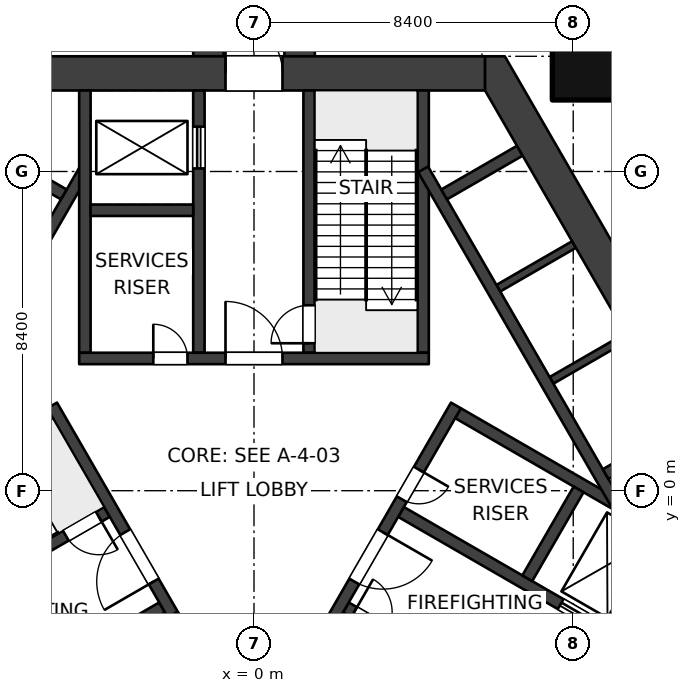
"""IFC4 building model, lengths in metres.
Left out: names, types, materials, properties, quantities, classifications, styles, units other than length and angle.
Written with IfcOpenShell. Run it as: python <this file> out.ifc"""

import sys

from ifc_helpers import new_model, si_unit, direction, frame, frame_2d, origin, origin_2d, place, context, subcontext, project, spatial, polyline, rectangle, outline, extrude, element, fill, save


model = new_model("IFC4")
c1 = context("Model", 3, precision=1e-05, world=origin(), true_north=direction((0.0, 1.0)))
c2 = subcontext(c1, "Body", "Model", "MODEL_VIEW")
j1 = project(units=[si_unit("LENGTHUNIT", "METRE"), si_unit("PLANEANGLEUNIT", "RADIAN")], contexts=[c1])
p1 = place(None, origin())
s1 = spatial("IfcSite", under=j1, at=p1, CompositionType="ELEMENT")
p2 = place(p1, origin())
s2 = spatial("IfcBuilding", under=s1, at=p2, CompositionType="ELEMENT")
p3 = place(p2, frame((0.0, 0.0, 11.0)))
s3 = spatial("IfcBuildingStorey", under=s2, at=p3, CompositionType="ELEMENT", Elevation=11.0)
p4 = place(p3, frame((9.0, 11.432, 0.0), z_axis=(0.0, 0.0, 1.0), x_axis=(1.0, 0.0, 0.0)))
e1 = element("IfcColumn", 1, at=p4, inside=s3, PredefinedType="COLUMN", context=c2, shape_type="SweptSolid", body=[
    extrude(rectangle(XDim=2.3, YDim=2.3, at=origin_2d()), origin(), (0.0, 0.0, 1.0), 5.0),
])
p5 = place(p3, frame((-6.08, 10.981, 0.0), z_axis=(0.0, 0.0, 1.0), x_axis=(1.0, 0.0, 0.0)))
e2 = element("IfcWall", 2, at=p5, inside=s3, PredefinedType="SHEAR", context=c2, shape_type="SweptSolid", body=[
    extrude(rectangle(XDim=12.161, YDim=0.9, at=frame_2d((6.08, 0.0))), origin(), (0.0, 0.0, 1.0), 5.0),
])
p6 = place(p5, frame((5.33, 0.0, 0.0)))
e3 = element("IfcOpeningElement", 3, at=p6, cuts=e2, PredefinedType="OPENING", context=c2, shape_type="SweptSolid", body=[
    extrude(rectangle(XDim=1.5, YDim=2.1, at=frame_2d((0.75, 1.05))), frame((0.0, 0.46, 0.0), z_axis=(0.0, -1.0, 0.0), x_axis=(1.0, 0.0, 0.0)), (0.0, 0.0, 1.0), 0.92),
])
p7 = place(p3, frame((12.551, -0.225, 0.0), z_axis=(0.0, 0.0, 1.0), x_axis=(-0.499997612506, -0.8660267822, 0.0)))
e4 = element("IfcWall", 4, at=p7, inside=s3, PredefinedType="SHEAR", context=c2, shape_type="SweptSolid", body=[
    extrude(rectangle(XDim=12.161, YDim=0.9, at=frame_2d((6.08, 0.0))), origin(), (0.0, 0.0, 1.0), 5.0),
])
p8 = place(p7, frame((5.33, 0.0, 0.0)))
e5 = element("IfcOpeningElement", 5, at=p8, cuts=e4, PredefinedType="OPENING", context=c2, shape_type="SweptSolid", body=[
    extrude(rectangle(XDim=1.5, YDim=2.1, at=frame_2d((0.75, 1.05))), frame((0.0, 0.46, 0.0), z_axis=(0.0, -1.0, 0.0), x_axis=(1.0, 0.0, 0.0)), (0.0, 0.0, 1.0), 0.92),
])
p9 = place(p3, origin())
e6 = element("IfcWall", 6, at=p9, inside=s3, PredefinedType="SHEAR", context=c2, shape_type="SweptSolid", body=[
    extrude(outline(polyline([(13.2, 0.0), (6.6, 11.432), (6.08, 11.432), (6.08, 10.531), (12.161, 0.0), (12.94, -0.45), (13.2, 0.0)])), origin(), (0.0, 0.0, 1.0), 5.0),
])
p10 = place(p3, frame((-4.6, 3.48, 0.0), z_axis=(0.0, 0.0, 1.0), x_axis=(1.0, 0.0, 0.0)))
e7 = element("IfcWall", 7, at=p10, inside=s3, PredefinedType="SHEAR", context=c2, shape_type="SweptSolid", body=[
    extrude(rectangle(XDim=9.2, YDim=0.3, at=frame_2d((4.6, 0.0))), origin(), (0.0, 0.0, 1.0), 5.0),
])
p11 = place(p10, frame((3.85, 0.0, 0.0)))
e8 = element("IfcOpeningElement", 8, at=p11, cuts=e7, PredefinedType="OPENING", context=c2, shape_type="SweptSolid", body=[
    extrude(rectangle(XDim=1.5, YDim=2.1, at=frame_2d((0.75, 1.05))), frame((0.0, 0.16, 0.0), z_axis=(0.0, -1.0, 0.0), x_axis=(1.0, 0.0, 0.0)), (0.0, 0.0, 1.0), 0.32),
])
p12 = place(p10, frame((1.95, 0.0, 0.0)))
e9 = element("IfcOpeningElement", 9, at=p12, cuts=e7, PredefinedType="OPENING", context=c2, shape_type="SweptSolid", body=[
    extrude(rectangle(XDim=0.9, YDim=2.1, at=frame_2d((0.45, 1.05))), frame((0.0, 0.16, 0.0), z_axis=(0.0, -1.0, 0.0), x_axis=(1.0, 0.0, 0.0)), (0.0, 0.0, 1.0), 0.32),
])
p13 = place(p3, frame((1.45, 3.63, 0.0), z_axis=(0.0, 0.0, 1.0), x_axis=(0.0, 1.0, 0.0)))
e10 = element("IfcWall", 10, at=p13, inside=s3, PredefinedType="SHEAR", context=c2, shape_type="SweptSolid", body=[
    extrude(rectangle(XDim=6.902, YDim=0.3, at=frame_2d((3.451, 0.0))), origin(), (0.0, 0.0, 1.0), 5.0),
])
p14 = place(p13, frame((0.25, 0.0, 0.0)))
e11 = element("IfcOpeningElement", 11, at=p14, cuts=e10, PredefinedType="OPENING", context=c2, shape_type="SweptSolid", body=[
    extrude(rectangle(XDim=1.0, YDim=2.1, at=frame_2d((0.5, 1.05))), frame((0.0, 0.16, 0.0), z_axis=(0.0, -1.0, 0.0), x_axis=(1.0, 0.0, 0.0)), (0.0, 0.0, 1.0), 0.32),
])
p15 = place(p3, frame((4.45, 3.63, 0.0), z_axis=(0.0, 0.0, 1.0), x_axis=(0.0, 1.0, 0.0)))
e12 = element("IfcWall", 12, at=p15, inside=s3, PredefinedType="SHEAR", context=c2, shape_type="SweptSolid", body=[
    extrude(rectangle(XDim=6.902, YDim=0.3, at=frame_2d((3.451, 0.0))), origin(), (0.0, 0.0, 1.0), 5.0),
])
p16 = place(p3, frame((-1.45, 3.63, 0.0), z_axis=(0.0, 0.0, 1.0), x_axis=(0.0, 1.0, 0.0)))
e13 = element("IfcWall", 13, at=p16, inside=s3, PredefinedType="SHEAR", context=c2, shape_type="SweptSolid", body=[
    extrude(rectangle(XDim=6.902, YDim=0.3, at=frame_2d((3.451, 0.0))), origin(), (0.0, 0.0, 1.0), 5.0),
])
p17 = place(p16, frame((4.85, 0.0, 0.0)))
e14 = element("IfcOpeningElement", 14, at=p17, cuts=e13, PredefinedType="OPENING", context=c2, shape_type="SweptSolid", body=[
    extrude(rectangle(XDim=1.1, YDim=2.1, at=frame_2d((0.55, 1.05))), frame((0.0, 0.16, 0.0), z_axis=(0.0, -1.0, 0.0), x_axis=(1.0, 0.0, 0.0)), (0.0, 0.0, 1.0), 0.32),
])
p18 = place(p3, frame((-4.45, 3.63, 0.0), z_axis=(0.0, 0.0, 1.0), x_axis=(0.0, 1.0, 0.0)))
e15 = element("IfcWall", 15, at=p18, inside=s3, PredefinedType="SHEAR", context=c2, shape_type="SweptSolid", body=[
    extrude(rectangle(XDim=6.902, YDim=0.3, at=frame_2d((3.451, 0.0))), origin(), (0.0, 0.0, 1.0), 5.0),
])
p19 = place(p3, frame((-4.3, 7.38, 0.0), z_axis=(0.0, 0.0, 1.0), x_axis=(1.0, 0.0, 0.0)))
e16 = element("IfcWall", 16, at=p19, inside=s3, PredefinedType="SHEAR", context=c2, shape_type="SweptSolid", body=[
    extrude(rectangle(XDim=2.7, YDim=0.3, at=frame_2d((1.35, 0.0))), origin(), (0.0, 0.0, 1.0), 5.0),
])
p20 = place(p3, frame((-0.714, -5.724, 0.0), z_axis=(0.0, 0.0, 1.0), x_axis=(-0.499995050369, 0.866028261437, 0.0)))
e17 = element("IfcWall", 17, at=p20, inside=s3, PredefinedType="SHEAR", context=c2, shape_type="SweptSolid", body=[
    extrude(rectangle(XDim=9.2, YDim=0.3, at=frame_2d((4.6, 0.0))), origin(), (0.0, 0.0, 1.0), 5.0),
])
p21 = place(p20, frame((3.85, 0.0, 0.0)))
e18 = element("IfcOpeningElement", 18, at=p21, cuts=e17, PredefinedType="OPENING", context=c2, shape_type="SweptSolid", body=[
    extrude(rectangle(XDim=1.5, YDim=2.1, at=frame_2d((0.75, 1.05))), frame((0.0, 0.16, 0.0), z_axis=(0.0, -1.0, 0.0), x_axis=(1.0, 0.0, 0.0)), (0.0, 0.0, 1.0), 0.32),
])
p22 = place(p20, frame((1.95, 0.0, 0.0)))
e19 = element("IfcOpeningElement", 19, at=p22, cuts=e17, PredefinedType="OPENING", context=c2, shape_type="SweptSolid", body=[
    extrude(rectangle(XDim=0.9, YDim=2.1, at=frame_2d((0.45, 1.05))), frame((0.0, 0.16, 0.0), z_axis=(0.0, -1.0, 0.0), x_axis=(1.0, 0.0, 0.0)), (0.0, 0.0, 1.0), 0.32),
])
p23 = place(p3, frame((-3.869, -0.559, 0.0), z_axis=(0.0, 0.0, 1.0), x_axis=(-0.86602711848, -0.499997030048, 0.0)))
e20 = element("IfcWall", 20, at=p23, inside=s3, PredefinedType="SHEAR", context=c2, shape_type="SweptSolid", body=[
    extrude(rectangle(XDim=6.901, YDim=0.3, at=frame_2d((3.451, 0.0))), origin(), (0.0, 0.0, 1.0), 5.0),
])
p24 = place(p23, frame((0.25, 0.0, 0.0)))
e21 = element("IfcOpeningElement", 21, at=p24, cuts=e20, PredefinedType="OPENING", context=c2, shape_type="SweptSolid", body=[
    extrude(rectangle(XDim=1.0, YDim=2.1, at=frame_2d((0.5, 1.05))), frame((0.0, 0.16, 0.0), z_axis=(0.0, -1.0, 0.0), x_axis=(1.0, 0.0, 0.0)), (0.0, 0.0, 1.0), 0.32),
])
p25 = place(p3, frame((-5.369, 2.039, 0.0), z_axis=(0.0, 0.0, 1.0), x_axis=(-0.86602711848, -0.499997030048, 0.0)))
e22 = element("IfcWall", 22, at=p25, inside=s3, PredefinedType="SHEAR", context=c2, shape_type="SweptSolid", body=[
    extrude(rectangle(XDim=6.901, YDim=0.3, at=frame_2d((3.451, 0.0))), origin(), (0.0, 0.0, 1.0), 5.0),
])
p26 = place(p3, frame((-2.419, -3.071, 0.0), z_axis=(0.0, 0.0, 1.0), x_axis=(-0.86602711848, -0.499997030048, 0.0)))
e23 = element("IfcWall", 23, at=p26, inside=s3, PredefinedType="SHEAR", context=c2, shape_type="SweptSolid", body=[
    extrude(rectangle(XDim=6.901, YDim=0.3, at=frame_2d((3.451, 0.0))), origin(), (0.0, 0.0, 1.0), 5.0),
])
p27 = place(p26, frame((4.85, 0.0, 0.0)))
e24 = element("IfcOpeningElement", 24, at=p27, cuts=e23, PredefinedType="OPENING", context=c2, shape_type="SweptSolid", body=[
    extrude(rectangle(XDim=1.1, YDim=2.1, at=frame_2d((0.55, 1.05))), frame((0.0, 0.16, 0.0), z_axis=(0.0, -1.0, 0.0), x_axis=(1.0, 0.0, 0.0)), (0.0, 0.0, 1.0), 0.32),
])
p28 = place(p3, frame((5.314, 2.244, 0.0), z_axis=(0.0, 0.0, 1.0), x_axis=(-0.499995050369, -0.866028261437, 0.0)))
e25 = element("IfcWall", 25, at=p28, inside=s3, PredefinedType="SHEAR", context=c2, shape_type="SweptSolid", body=[
    extrude(rectangle(XDim=9.2, YDim=0.3, at=frame_2d((4.6, 0.0))), origin(), (0.0, 0.0, 1.0), 5.0),
])
p29 = place(p28, frame((3.85, 0.0, 0.0)))
e26 = element("IfcOpeningElement", 26, at=p29, cuts=e25, PredefinedType="OPENING", context=c2, shape_type="SweptSolid", body=[
    extrude(rectangle(XDim=1.5, YDim=2.1, at=frame_2d((0.75, 1.05))), frame((0.0, 0.16, 0.0), z_axis=(0.0, -1.0, 0.0), x_axis=(1.0, 0.0, 0.0)), (0.0, 0.0, 1.0), 0.32),
])
p30 = place(p28, frame((1.95, 0.0, 0.0)))
e27 = element("IfcOpeningElement", 27, at=p30, cuts=e25, PredefinedType="OPENING", context=c2, shape_type="SweptSolid", body=[
    extrude(rectangle(XDim=0.9, YDim=2.1, at=frame_2d((0.45, 1.05))), frame((0.0, 0.16, 0.0), z_axis=(0.0, -1.0, 0.0), x_axis=(1.0, 0.0, 0.0)), (0.0, 0.0, 1.0), 0.32),
])
p31 = place(p3, frame((2.419, -3.071, 0.0), z_axis=(0.0, 0.0, 1.0), x_axis=(0.86602711848, -0.499997030048, 0.0)))
e28 = element("IfcWall", 28, at=p31, inside=s3, PredefinedType="SHEAR", context=c2, shape_type="SweptSolid", body=[
    extrude(rectangle(XDim=6.901, YDim=0.3, at=frame_2d((3.451, 0.0))), origin(), (0.0, 0.0, 1.0), 5.0),
])
p32 = place(p31, frame((0.25, 0.0, 0.0)))
e29 = element("IfcOpeningElement", 29, at=p32, cuts=e28, PredefinedType="OPENING", context=c2, shape_type="SweptSolid", body=[
    extrude(rectangle(XDim=1.0, YDim=2.1, at=frame_2d((0.5, 1.05))), frame((0.0, 0.16, 0.0), z_axis=(0.0, -1.0, 0.0), x_axis=(1.0, 0.0, 0.0)), (0.0, 0.0, 1.0), 0.32),
])
p33 = place(p3, frame((3.869, -0.559, 0.0), z_axis=(0.0, 0.0, 1.0), x_axis=(0.86602711848, -0.499997030048, 0.0)))
e30 = element("IfcWall", 30, at=p33, inside=s3, PredefinedType="SHEAR", context=c2, shape_type="SweptSolid", body=[
    extrude(rectangle(XDim=6.901, YDim=0.3, at=frame_2d((3.451, 0.0))), origin(), (0.0, 0.0, 1.0), 5.0),
])
p34 = place(p33, frame((4.85, 0.0, 0.0)))
e31 = element("IfcOpeningElement", 31, at=p34, cuts=e30, PredefinedType="OPENING", context=c2, shape_type="SweptSolid", body=[
    extrude(rectangle(XDim=1.1, YDim=2.1, at=frame_2d((0.55, 1.05))), frame((0.0, 0.16, 0.0), z_axis=(0.0, -1.0, 0.0), x_axis=(1.0, 0.0, 0.0)), (0.0, 0.0, 1.0), 0.32),
])
p35 = place(p3, frame((5.369, 2.039, 0.0), z_axis=(0.0, 0.0, 1.0), x_axis=(0.86602711848, -0.499997030048, 0.0)))
e32 = element("IfcWall", 32, at=p35, inside=s3, PredefinedType="SHEAR", context=c2, shape_type="SweptSolid", body=[
    extrude(rectangle(XDim=6.901, YDim=0.3, at=frame_2d((3.451, 0.0))), origin(), (0.0, 0.0, 1.0), 5.0),
])
p36 = place(p3, frame((8.541, 0.034, 0.0), z_axis=(0.0, 0.0, 1.0), x_axis=(-0.50000943426, -0.866019956843, 0.0)))
e33 = element("IfcWall", 33, at=p36, inside=s3, PredefinedType="SHEAR", context=c2, shape_type="SweptSolid", body=[
    extrude(rectangle(XDim=2.7, YDim=0.3, at=frame_2d((1.35, 0.0))), origin(), (0.0, 0.0, 1.0), 5.0),
])
p37 = place(p3, frame((4.45, 8.455, 0.0), z_axis=(0.0, 0.0, 1.0), x_axis=(0.500002290144, -0.866024081565, 0.0)))
e34 = element("IfcWall", 34, at=p37, inside=s3, PredefinedType="SHEAR", context=c2, shape_type="SweptSolid", body=[
    extrude(rectangle(XDim=10.195, YDim=0.3, at=frame_2d((5.098, 0.0))), origin(), (0.0, 0.0, 1.0), 5.0),
])
for number, where, z_axis, x_axis in (
    (35, (5.004, 7.796, 0.0), (0.0, 0.0, 1.0), (0.866, 0.5, 0.0)),
    (36, (9.254, 0.435, 0.0), (0.0, 0.0, 1.0), (0.866, 0.5, 0.0)),
):
    element("IfcWall", number, at=place(p3, frame(where, z_axis=z_axis, x_axis=x_axis)), inside=s3, PredefinedType="SHEAR", context=c2, shape_type="SweptSolid", body=[
        extrude(rectangle(XDim=2.3, YDim=0.3, at=frame_2d((1.15, 0.0))), origin(), (0.0, 0.0, 1.0), 5.0),
    ])
for number, where, z_axis, x_axis in (
    (37, (6.429, 5.328, 0.0), (0.0, 0.0, 1.0), (0.866, 0.5, 0.0)),
    (38, (7.829, 2.903, 0.0), (0.0, 0.0, 1.0), (0.866, 0.5, 0.0)),
):
    element("IfcWall", number, at=place(p3, frame(where, z_axis=z_axis, x_axis=x_axis)), inside=s3, PredefinedType="SHEAR", context=c2, shape_type="SweptSolid", body=[
        extrude(rectangle(XDim=2.3, YDim=0.2, at=frame_2d((1.15, 0.0))), origin(), (0.0, 0.0, 1.0), 5.0),
    ])
p38 = place(p3, frame((-9.548, -0.374, 0.0), z_axis=(0.0, 0.0, 1.0), x_axis=(0.500002290144, 0.866024081565, 0.0)))
e39 = element("IfcWall", 39, at=p38, inside=s3, PredefinedType="SHEAR", context=c2, shape_type="SweptSolid", body=[
    extrude(rectangle(XDim=10.195, YDim=0.3, at=frame_2d((5.098, 0.0))), origin(), (0.0, 0.0, 1.0), 5.0),
])
p39 = place(p3, frame((-5.004, 7.796, 0.0), z_axis=(0.0, 0.0, 1.0), x_axis=(-0.866053019151, 0.499952165731, 0.0)))
e40 = element("IfcWall", 40, at=p39, inside=s3, PredefinedType="SHEAR", context=c2, shape_type="SweptSolid", body=[
    extrude(rectangle(XDim=2.3, YDim=0.3, at=frame_2d((1.15, 0.0))), origin(), (0.0, 0.0, 1.0), 5.0),
])
p40 = place(p3, frame((-1.2, 10.981, 0.0), z_axis=(0.0, 0.0, 1.0), x_axis=(0.0, 1.0, 0.0)))
e41 = element("IfcWall", 41, at=p40, inside=s3, PredefinedType="SHEAR", context=c2, shape_type="SweptSolid", body=[
    extrude(rectangle(XDim=36.75, YDim=0.8, at=frame_2d((18.375, 0.0))), origin(), (0.0, 0.0, 1.0), 5.0),
])
p41 = place(p40, frame((2.85, 0.0, 0.0)))
e42 = element("IfcOpeningElement", 42, at=p41, cuts=e41, PredefinedType="OPENING", context=c2, shape_type="SweptSolid", body=[
    extrude(rectangle(XDim=1.2, YDim=2.1, at=frame_2d((0.6, 1.05))), frame((0.0, 0.41, 0.0), z_axis=(0.0, -1.0, 0.0), x_axis=(1.0, 0.0, 0.0)), (0.0, 0.0, 1.0), 0.82),
])
p42 = place(p3, frame((1.2, 10.981, 0.0), z_axis=(0.0, 0.0, 1.0), x_axis=(0.0, 1.0, 0.0)))
e43 = element("IfcWall", 43, at=p42, inside=s3, PredefinedType="SHEAR", context=c2, shape_type="SweptSolid", body=[
    extrude(rectangle(XDim=36.75, YDim=0.8, at=frame_2d((18.375, 0.0))), origin(), (0.0, 0.0, 1.0), 5.0),
])
p43 = place(p42, frame((10.0, 0.0, 0.0)))
e44 = element("IfcOpeningElement", 44, at=p43, cuts=e43, PredefinedType="OPENING", context=c2, shape_type="SweptSolid", body=[
    extrude(rectangle(XDim=1.0, YDim=2.1, at=frame_2d((0.5, 1.05))), frame((0.0, 0.41, 0.0), z_axis=(0.0, -1.0, 0.0), x_axis=(1.0, 0.0, 0.0)), (0.0, 0.0, 1.0), 0.82),
])
p44 = place(p42, frame((2.85, 0.0, 0.0)))
e45 = element("IfcOpeningElement", 45, at=p44, cuts=e43, PredefinedType="OPENING", context=c2, shape_type="SweptSolid", body=[
    extrude(rectangle(XDim=1.2, YDim=2.1, at=frame_2d((0.6, 1.05))), frame((0.0, 0.41, 0.0), z_axis=(0.0, -1.0, 0.0), x_axis=(1.0, 0.0, 0.0)), (0.0, 0.0, 1.0), 0.82),
])
p45 = place(p3, frame((9.45, 6.495, 0.0), z_axis=(0.0, 0.0, 1.0), x_axis=(0.866025301493, -0.500000177174, 0.0)))
e46 = element("IfcWall", 46, at=p45, inside=s3, PredefinedType="SOLIDWALL", context=c2, shape_type="SweptSolid", body=[
    extrude(rectangle(XDim=43.095, YDim=0.3, at=frame_2d((21.548, 0.0))), origin(), (0.0, 0.0, 1.0), 4.7),
])
p46 = place(p45, frame((26.595, 0.0, 0.0)))
e47 = element("IfcOpeningElement", 47, at=p46, cuts=e46, PredefinedType="OPENING", context=c2, shape_type="SweptSolid", body=[
    extrude(rectangle(XDim=1.8, YDim=2.4, at=frame_2d((0.9, 1.2))), frame((0.0, 0.16, 0.0), z_axis=(0.0, -1.0, 0.0), x_axis=(1.0, 0.0, 0.0)), (0.0, 0.0, 1.0), 0.32),
])
p47 = place(p17, origin())
e48 = element("IfcDoor", 48, at=p47, inside=s3, OperationType="DOUBLE_DOOR_SLIDING", PredefinedType="DOOR", context=c2, shape_type="SweptSolid", body=[
    extrude(rectangle(XDim=1.1, YDim=2.1, at=frame_2d((0.55, 1.05))), frame((0.0, 0.025, 0.0), z_axis=(0.0, -1.0, 0.0), x_axis=(1.0, 0.0, 0.0)), (0.0, 0.0, 1.0), 0.05),
])
fill(e14, e48)
p48 = place(p34, origin())
e49 = element("IfcDoor", 49, at=p48, inside=s3, OperationType="DOUBLE_DOOR_SLIDING", PredefinedType="DOOR", context=c2, shape_type="SweptSolid", body=[
    extrude(rectangle(XDim=1.1, YDim=2.1, at=frame_2d((0.55, 1.05))), frame((0.0, 0.025, 0.0), z_axis=(0.0, -1.0, 0.0), x_axis=(1.0, 0.0, 0.0)), (0.0, 0.0, 1.0), 0.05),
])
fill(e31, e49)
p49 = place(p11, origin())
e50 = element("IfcDoor", 50, at=p49, inside=s3, OperationType="DOUBLE_DOOR_DOUBLE_SWING", PredefinedType="DOOR", context=c2, shape_type="SweptSolid", body=[
    extrude(rectangle(XDim=1.5, YDim=2.1, at=frame_2d((0.75, 1.05))), frame((0.0, 0.025, 0.0), z_axis=(0.0, -1.0, 0.0), x_axis=(1.0, 0.0, 0.0)), (0.0, 0.0, 1.0), 0.05),
])
fill(e8, e50)
p50 = place(p12, origin())
e51 = element("IfcDoor", 51, at=p50, inside=s3, OperationType="SINGLE_SWING_LEFT", PredefinedType="DOOR", context=c2, shape_type="SweptSolid", body=[
    extrude(rectangle(XDim=0.9, YDim=2.1, at=frame_2d((0.45, 1.05))), frame((0.0, 0.025, 0.0), z_axis=(0.0, -1.0, 0.0), x_axis=(1.0, 0.0, 0.0)), (0.0, 0.0, 1.0), 0.05),
])
fill(e9, e51)
p51 = place(p14, origin())
e52 = element("IfcDoor", 52, at=p51, inside=s3, OperationType="SINGLE_SWING_LEFT", PredefinedType="DOOR", context=c2, shape_type="SweptSolid", body=[
    extrude(rectangle(XDim=1.0, YDim=2.1, at=frame_2d((0.5, 1.05))), frame((0.0, 0.025, 0.0), z_axis=(0.0, -1.0, 0.0), x_axis=(1.0, 0.0, 0.0)), (0.0, 0.0, 1.0), 0.05),
])
fill(e11, e52)
p52 = place(p6, origin())
e53 = element("IfcDoor", 53, at=p52, inside=s3, OperationType="DOUBLE_DOOR_DOUBLE_SWING", PredefinedType="DOOR", context=c2, shape_type="SweptSolid", body=[
    extrude(rectangle(XDim=1.5, YDim=2.1, at=frame_2d((0.75, 1.05))), frame((0.0, 0.025, 0.0), z_axis=(0.0, -1.0, 0.0), x_axis=(1.0, 0.0, 0.0)), (0.0, 0.0, 1.0), 0.05),
])
fill(e3, e53)
p53 = place(p21, origin())
e54 = element("IfcDoor", 54, at=p53, inside=s3, OperationType="DOUBLE_DOOR_DOUBLE_SWING", PredefinedType="DOOR", context=c2, shape_type="SweptSolid", body=[
    extrude(rectangle(XDim=1.5, YDim=2.1, at=frame_2d((0.75, 1.05))), frame((0.0, 0.025, 0.0), z_axis=(0.0, -1.0, 0.0), x_axis=(1.0, 0.0, 0.0)), (0.0, 0.0, 1.0), 0.05),
])
fill(e18, e54)
p54 = place(p24, origin())
e55 = element("IfcDoor", 55, at=p54, inside=s3, OperationType="SINGLE_SWING_LEFT", PredefinedType="DOOR", context=c2, shape_type="SweptSolid", body=[
    extrude(rectangle(XDim=1.0, YDim=2.1, at=frame_2d((0.5, 1.05))), frame((0.0, 0.025, 0.0), z_axis=(0.0, -1.0, 0.0), x_axis=(1.0, 0.0, 0.0)), (0.0, 0.0, 1.0), 0.05),
])
fill(e21, e55)
p55 = place(p29, origin())
e56 = element("IfcDoor", 56, at=p55, inside=s3, OperationType="DOUBLE_DOOR_DOUBLE_SWING", PredefinedType="DOOR", context=c2, shape_type="SweptSolid", body=[
    extrude(rectangle(XDim=1.5, YDim=2.1, at=frame_2d((0.75, 1.05))), frame((0.0, 0.025, 0.0), z_axis=(0.0, -1.0, 0.0), x_axis=(1.0, 0.0, 0.0)), (0.0, 0.0, 1.0), 0.05),
])
fill(e26, e56)
p56 = place(p30, origin())
e57 = element("IfcDoor", 57, at=p56, inside=s3, OperationType="SINGLE_SWING_LEFT", PredefinedType="DOOR", context=c2, shape_type="SweptSolid", body=[
    extrude(rectangle(XDim=0.9, YDim=2.1, at=frame_2d((0.45, 1.05))), frame((0.0, 0.025, 0.0), z_axis=(0.0, -1.0, 0.0), x_axis=(1.0, 0.0, 0.0)), (0.0, 0.0, 1.0), 0.05),
])
fill(e27, e57)
p57 = place(p32, origin())
e58 = element("IfcDoor", 58, at=p57, inside=s3, OperationType="SINGLE_SWING_LEFT", PredefinedType="DOOR", context=c2, shape_type="SweptSolid", body=[
    extrude(rectangle(XDim=1.0, YDim=2.1, at=frame_2d((0.5, 1.05))), frame((0.0, 0.025, 0.0), z_axis=(0.0, -1.0, 0.0), x_axis=(1.0, 0.0, 0.0)), (0.0, 0.0, 1.0), 0.05),
])
fill(e29, e58)
save(model, sys.argv[1])
